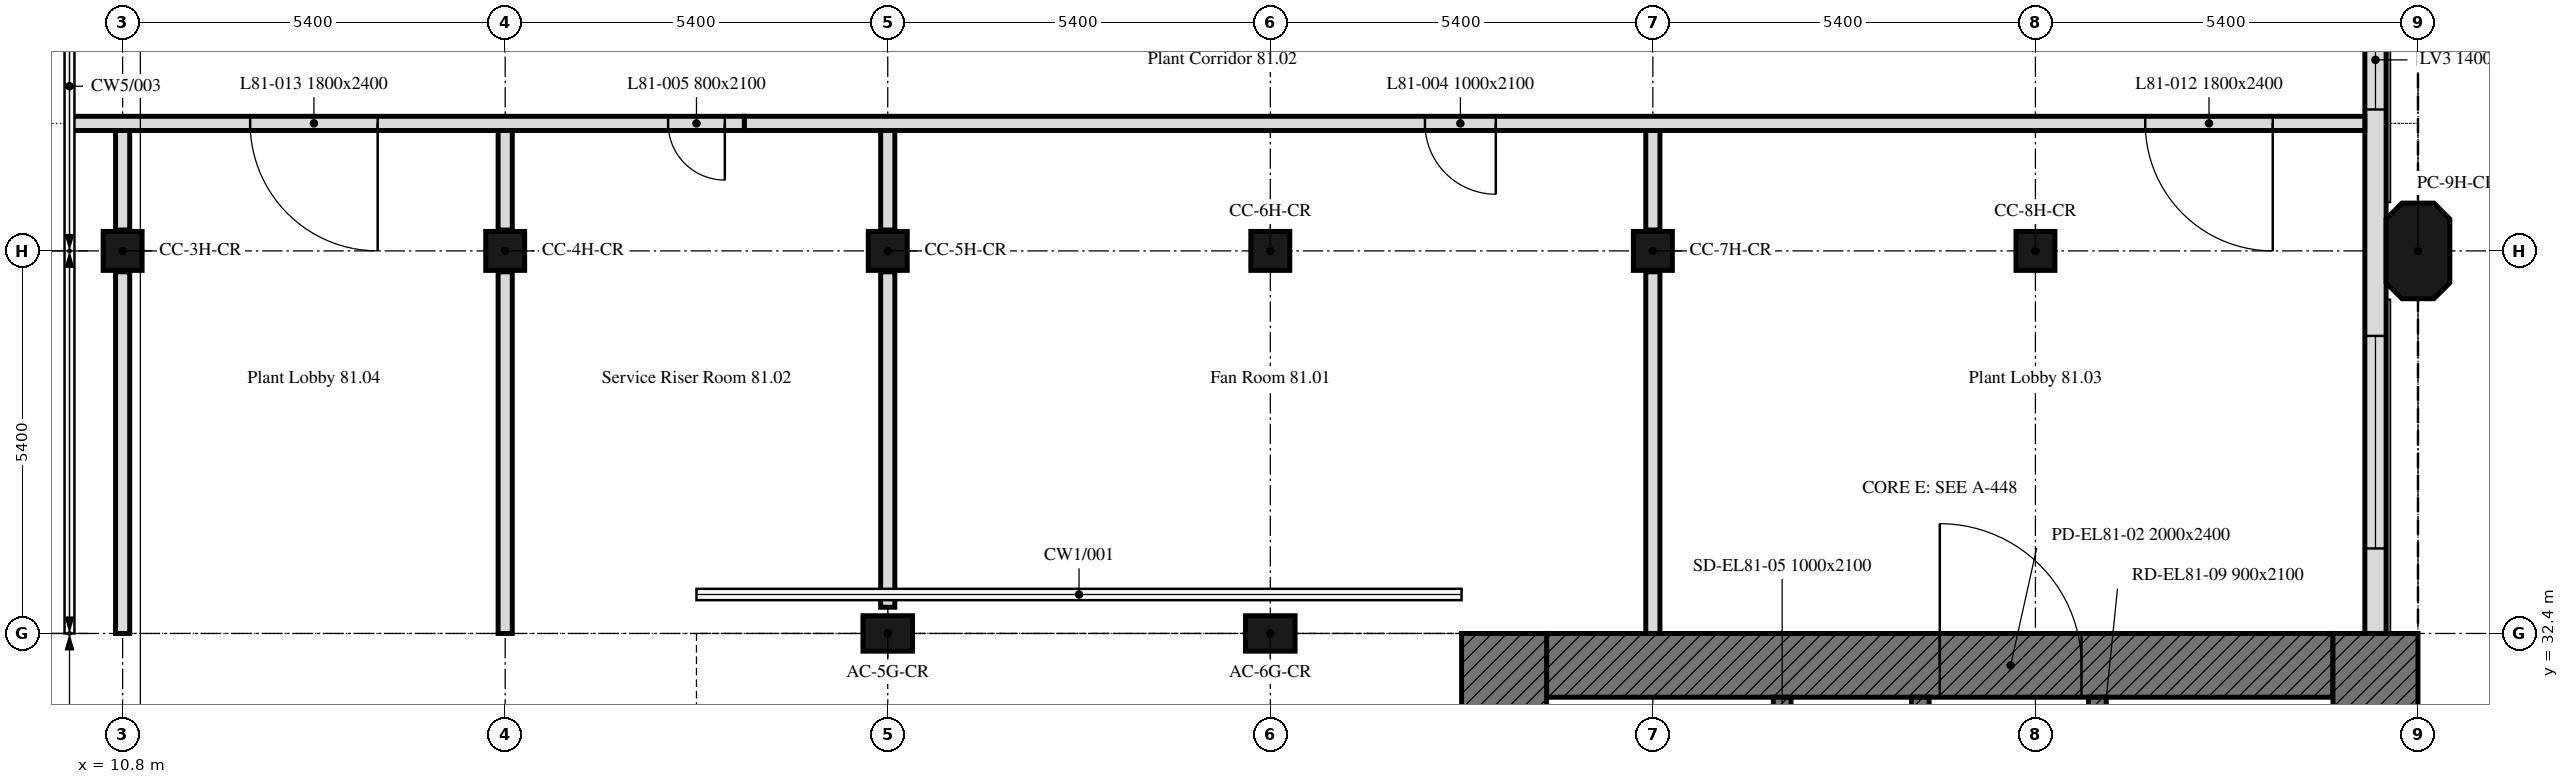
"""IFC4 building model, lengths in metres.
Left out: names, types, materials, properties, quantities, classifications, styles, units other than length and angle.
Written with IfcOpenShell. Run it as: python <this file> out.ifc"""

import sys

from ifc_helpers import new_model, si_unit, direction, frame, frame_2d, origin, origin_2d, place, context, subcontext, project, spatial, polyline, rectangle, outline, extrude, element, fill, save


model = new_model("IFC4")
c1 = context("Model", 3, precision=1e-05, world=origin(), true_north=direction((0.0, 1.0)))
c2 = subcontext(c1, "Body", "Model", "MODEL_VIEW")
j1 = project(units=[si_unit("LENGTHUNIT", "METRE"), si_unit("PLANEANGLEUNIT", "RADIAN")], contexts=[c1])
p1 = place(None, origin())
s1 = spatial("IfcSite", under=j1, at=p1, CompositionType="ELEMENT")
p2 = place(p1, origin())
s2 = spatial("IfcBuilding", under=s1, at=p2, CompositionType="ELEMENT")
p3 = place(p2, frame((0.0, 0.0, 326.2)))
s3 = spatial("IfcBuildingStorey", under=s2, at=p3, CompositionType="ELEMENT", Elevation=326.2)
for number, where, z_axis, x_axis in (
    (1, (21.6, 32.4, 0.0), (0.0, 0.0, 1.0), (1.0, 0.0, 0.0)),
    (2, (27.0, 32.4, 0.0), (0.0, 0.0, 1.0), (1.0, 0.0, 0.0)),
):
    element("IfcColumn", number, at=place(p3, frame(where, z_axis=z_axis, x_axis=x_axis)), inside=s3, PredefinedType="COLUMN", context=c2, shape_type="SweptSolid", body=[
        extrude(rectangle(XDim=0.7, YDim=0.5, at=origin_2d()), origin(), (0.0, 0.0, 1.0), 4.2),
    ])
p4 = place(p3, frame((10.8, 37.8, 0.0), z_axis=(0.0, 0.0, 1.0), x_axis=(1.0, 0.0, 0.0)))
e3 = element("IfcColumn", 3, at=p4, inside=s3, PredefinedType="COLUMN", context=c2, shape_type="SweptSolid", body=[
    extrude(rectangle(XDim=0.55, YDim=0.55, at=origin_2d()), origin(), (0.0, 0.0, 1.0), 3.3),
])
for number, where, z_axis, x_axis in (
    (4, (16.2, 37.8, 0.0), (0.0, 0.0, 1.0), (1.0, 0.0, 0.0)),
    (5, (21.6, 37.8, 0.0), (0.0, 0.0, 1.0), (1.0, 0.0, 0.0)),
    (6, (27.0, 37.8, 0.0), (0.0, 0.0, 1.0), (1.0, 0.0, 0.0)),
    (7, (32.4, 37.8, 0.0), (0.0, 0.0, 1.0), (1.0, 0.0, 0.0)),
    (8, (37.8, 37.8, 0.0), (0.0, 0.0, 1.0), (1.0, 0.0, 0.0)),
):
    element("IfcColumn", number, at=place(p3, frame(where, z_axis=z_axis, x_axis=x_axis)), inside=s3, PredefinedType="COLUMN", context=c2, shape_type="SweptSolid", body=[
        extrude(rectangle(XDim=0.55, YDim=0.55, at=origin_2d()), origin(), (0.0, 0.0, 1.0), 4.2),
    ])
p5 = place(p3, frame((43.2, 37.8, 0.0), z_axis=(0.0, 0.0, 1.0), x_axis=(0.0, 1.0, 0.0)))
e9 = element("IfcColumn", 9, at=p5, inside=s3, PredefinedType="COLUMN", context=c2, shape_type="SweptSolid", body=[
    extrude(outline(polyline([(-0.45, -0.45), (0.45, -0.45), (0.675, -0.225), (0.675, 0.225), (0.45, 0.45), (-0.45, 0.45), (-0.675, 0.225), (-0.675, -0.225), (-0.45, -0.45)])), origin(), (0.0, 0.0, 1.0), 4.2),
])
p6 = place(p3, frame((42.6, 32.4, 0.0), z_axis=(0.0, 0.0, 1.0), x_axis=(0.0, 1.0, 0.0)))
e10 = element("IfcWall", 10, at=p6, inside=s3, PredefinedType="SOLIDWALL", context=c2, shape_type="SweptSolid", body=[
    extrude(outline(polyline([(0.0, 0.0), (10.614, 0.0), (10.614, 4.2), (10.024, 4.2), (9.434, 4.2), (8.845, 4.2), (8.255, 4.2), (7.665, 4.2), (7.076, 4.2), (6.486, 4.2), (5.896, 4.2), (5.307, 4.2), (4.717, 4.2), (4.127, 4.2), (3.538, 4.2), (2.948, 4.2), (2.359, 4.2), (1.769, 4.2), (1.179, 4.2), (0.59, 4.2), (0.0, 4.2), (0.0, 0.0)])), frame((0.0, 0.15, 0.0), z_axis=(0.0, -1.0, 0.0), x_axis=(1.0, 0.0, 0.0)), (0.0, 0.0, 1.0), 0.3),
])
p7 = place(p6, frame((1.2, 0.0, 0.6)))
e11 = element("IfcOpeningElement", 11, at=p7, cuts=e10, PredefinedType="OPENING", context=c2, shape_type="SweptSolid", body=[
    extrude(rectangle(XDim=3.0, YDim=1.8, at=frame_2d((1.5, 0.9))), frame((0.0, 0.16, 0.0), z_axis=(0.0, -1.0, 0.0), x_axis=(1.0, 0.0, 0.0)), (0.0, 0.0, 1.0), 0.32),
])
p8 = place(p6, frame((7.396, 0.0, 0.6)))
e12 = element("IfcOpeningElement", 12, at=p8, cuts=e10, PredefinedType="OPENING", context=c2, shape_type="SweptSolid", body=[
    extrude(rectangle(XDim=1.4, YDim=1.8, at=frame_2d((0.7, 0.9))), frame((0.0, 0.16, 0.0), z_axis=(0.0, -1.0, 0.0), x_axis=(1.0, 0.0, 0.0)), (0.0, 0.0, 1.0), 0.32),
])
p9 = place(p3, frame((30.9, 31.95, 0.0), z_axis=(0.0, 0.0, 1.0), x_axis=(1.0, 0.0, 0.0)))
e13 = element("IfcWall", 13, at=p9, inside=s3, PredefinedType="SOLIDWALL", context=c2, shape_type="SweptSolid", body=[
    extrude(rectangle(XDim=11.1, YDim=0.9, at=frame_2d((5.55, 0.0))), origin(), (0.0, 0.0, 1.0), 4.2),
])
p10 = place(p9, frame((5.55, 0.0, 0.0)))
e14 = element("IfcOpeningElement", 14, at=p10, cuts=e13, PredefinedType="OPENING", context=c2, shape_type="SweptSolid", body=[
    extrude(rectangle(XDim=2.0, YDim=2.4, at=frame_2d((1.0, 1.2))), frame((0.0, 0.45, 0.0), z_axis=(0.0, -1.0, 0.0), x_axis=(1.0, 0.0, 0.0)), (0.0, 0.0, 1.0), 0.9),
])
for number, where, z_axis, x_axis in (
    (15, (42.6, 32.4, 0.0), (0.0, 0.0, 1.0), (0.0, -1.0, 0.0)),
    (16, (30.3, 16.2, 0.0), (0.0, 0.0, 1.0), (0.0, 1.0, 0.0)),
):
    element("IfcWall", number, at=place(p3, frame(where, z_axis=z_axis, x_axis=x_axis)), inside=s3, PredefinedType="SOLIDWALL", context=c2, shape_type="SweptSolid", body=[
        extrude(rectangle(XDim=16.2, YDim=1.2, at=frame_2d((8.1, 0.0))), origin(), (0.0, 0.0, 1.0), 4.2),
    ])
p11 = place(p3, frame((38.675, 17.1, 0.0), z_axis=(0.0, 0.0, 1.0), x_axis=(0.0, 1.0, 0.0)))
e17 = element("IfcWall", 17, at=p11, inside=s3, PredefinedType="SOLIDWALL", context=c2, shape_type="SweptSolid", body=[
    extrude(rectangle(XDim=14.4, YDim=0.25, at=frame_2d((7.2, 0.0))), origin(), (0.0, 0.0, 1.0), 4.2),
])
p12 = place(p11, frame((4.6, 0.0, 0.0)))
e18 = element("IfcOpeningElement", 18, at=p12, cuts=e17, PredefinedType="OPENING", context=c2, shape_type="SweptSolid", body=[
    extrude(rectangle(XDim=1.0, YDim=2.1, at=frame_2d((0.5, 1.05))), frame((0.0, 0.125, 0.0), z_axis=(0.0, -1.0, 0.0), x_axis=(1.0, 0.0, 0.0)), (0.0, 0.0, 1.0), 0.25),
])
p13 = place(p11, frame((7.062, 0.0, 0.0)))
e19 = element("IfcOpeningElement", 19, at=p13, cuts=e17, PredefinedType="OPENING", context=c2, shape_type="SweptSolid", body=[
    extrude(rectangle(XDim=1.2, YDim=2.1, at=frame_2d((0.6, 1.05))), frame((0.0, 0.125, 0.0), z_axis=(0.0, -1.0, 0.0), x_axis=(1.0, 0.0, 0.0)), (0.0, 0.0, 1.0), 0.25),
])
p14 = place(p11, frame((10.106, 0.0, 0.0)))
e20 = element("IfcOpeningElement", 20, at=p14, cuts=e17, PredefinedType="OPENING", context=c2, shape_type="SweptSolid", body=[
    extrude(rectangle(XDim=0.9, YDim=2.1, at=frame_2d((0.45, 1.05))), frame((0.0, 0.125, 0.0), z_axis=(0.0, -1.0, 0.0), x_axis=(1.0, 0.0, 0.0)), (0.0, 0.0, 1.0), 0.25),
])
p15 = place(p11, frame((12.719, 0.0, 0.0)))
e21 = element("IfcOpeningElement", 21, at=p15, cuts=e17, PredefinedType="OPENING", context=c2, shape_type="SweptSolid", body=[
    extrude(rectangle(XDim=0.9, YDim=2.1, at=frame_2d((0.45, 1.05))), frame((0.0, 0.125, 0.0), z_axis=(0.0, -1.0, 0.0), x_axis=(1.0, 0.0, 0.0)), (0.0, 0.0, 1.0), 0.25),
])
p16 = place(p3, frame((34.225, 17.1, 0.0), z_axis=(0.0, 0.0, 1.0), x_axis=(0.0, 1.0, 0.0)))
e22 = element("IfcWall", 22, at=p16, inside=s3, PredefinedType="SOLIDWALL", context=c2, shape_type="SweptSolid", body=[
    extrude(rectangle(XDim=14.4, YDim=0.25, at=frame_2d((7.2, 0.0))), origin(), (0.0, 0.0, 1.0), 4.2),
])
p17 = place(p16, frame((13.15, 0.0, 0.0)))
e23 = element("IfcOpeningElement", 23, at=p17, cuts=e22, PredefinedType="OPENING", context=c2, shape_type="SweptSolid", body=[
    extrude(rectangle(XDim=1.0, YDim=2.1, at=frame_2d((0.5, 1.05))), frame((0.0, 0.125, 0.0), z_axis=(0.0, -1.0, 0.0), x_axis=(1.0, 0.0, 0.0)), (0.0, 0.0, 1.0), 0.25),
])
p18 = place(p16, frame((0.968, 0.0, 0.0)))
e24 = element("IfcOpeningElement", 24, at=p18, cuts=e22, PredefinedType="OPENING", context=c2, shape_type="SweptSolid", body=[
    extrude(rectangle(XDim=0.9, YDim=2.1, at=frame_2d((0.45, 1.05))), frame((0.0, 0.125, 0.0), z_axis=(0.0, -1.0, 0.0), x_axis=(1.0, 0.0, 0.0)), (0.0, 0.0, 1.0), 0.25),
])
p19 = place(p16, frame((3.468, 0.0, 0.0)))
e25 = element("IfcOpeningElement", 25, at=p19, cuts=e22, PredefinedType="OPENING", context=c2, shape_type="SweptSolid", body=[
    extrude(rectangle(XDim=0.9, YDim=2.1, at=frame_2d((0.45, 1.05))), frame((0.0, 0.125, 0.0), z_axis=(0.0, -1.0, 0.0), x_axis=(1.0, 0.0, 0.0)), (0.0, 0.0, 1.0), 0.25),
])
p20 = place(p16, frame((6.175, 0.0, 0.0)))
e26 = element("IfcOpeningElement", 26, at=p20, cuts=e22, PredefinedType="OPENING", context=c2, shape_type="SweptSolid", body=[
    extrude(rectangle(XDim=0.9, YDim=2.1, at=frame_2d((0.45, 1.05))), frame((0.0, 0.125, 0.0), z_axis=(0.0, -1.0, 0.0), x_axis=(1.0, 0.0, 0.0)), (0.0, 0.0, 1.0), 0.25),
])
p21 = place(p3, frame((36.175, 29.4, 0.0), z_axis=(0.0, 0.0, 1.0), x_axis=(0.0, 1.0, 0.0)))
e27 = element("IfcWall", 27, at=p21, inside=s3, PredefinedType="SOLIDWALL", context=c2, shape_type="SweptSolid", body=[
    extrude(rectangle(XDim=2.1, YDim=0.25, at=frame_2d((1.05, 0.0))), origin(), (0.0, 0.0, 1.0), 4.2),
])
p22 = place(p21, frame((0.5, 0.0, 0.0)))
e28 = element("IfcOpeningElement", 28, at=p22, cuts=e27, PredefinedType="OPENING", context=c2, shape_type="SweptSolid", body=[
    extrude(rectangle(XDim=1.0, YDim=2.1, at=frame_2d((0.5, 1.05))), frame((0.0, 0.125, 0.0), z_axis=(0.0, -1.0, 0.0), x_axis=(1.0, 0.0, 0.0)), (0.0, 0.0, 1.0), 0.25),
])
p23 = place(p3, frame((32.4, 32.4, 0.0), z_axis=(0.0, 0.0, 1.0), x_axis=(0.0, 1.0, 0.0)))
e29 = element("IfcWall", 29, at=p23, inside=s3, PredefinedType="PARTITIONING", context=c2, shape_type="SweptSolid", body=[
    extrude(rectangle(XDim=5.105, YDim=0.2, at=frame_2d((2.552, 0.0))), origin(), (0.0, 0.0, 1.0), 3.45),
])
for number, where, z_axis, x_axis in (
    (30, (32.4, 38.095, 0.0), (0.0, 0.0, 1.0), (0.0, 1.0, 0.0)),
    (31, (21.6, 39.5, 0.0), (0.0, 0.0, 1.0), (0.0, -1.0, 0.0)),
):
    element("IfcWall", number, at=place(p3, frame(where, z_axis=z_axis, x_axis=x_axis)), inside=s3, PredefinedType="PARTITIONING", context=c2, shape_type="SweptSolid", body=[
        extrude(rectangle(XDim=1.405, YDim=0.2, at=frame_2d((0.703, 0.0))), origin(), (0.0, 0.0, 1.0), 3.45),
    ])
p24 = place(p3, frame((21.6, 37.505, 0.0), z_axis=(0.0, 0.0, 1.0), x_axis=(0.0, -1.0, 0.0)))
e32 = element("IfcWall", 32, at=p24, inside=s3, PredefinedType="PARTITIONING", context=c2, shape_type="SweptSolid", body=[
    extrude(rectangle(XDim=4.735, YDim=0.2, at=frame_2d((2.367, 0.0))), origin(), (0.0, 0.0, 1.0), 3.45),
])
p25 = place(p3, frame((16.2, 39.5, 0.0), z_axis=(0.0, 0.0, 1.0), x_axis=(0.0, -1.0, 0.0)))
e33 = element("IfcWall", 33, at=p25, inside=s3, PredefinedType="PARTITIONING", context=c2, shape_type="SweptSolid", body=[
    extrude(rectangle(XDim=1.405, YDim=0.2, at=frame_2d((0.703, 0.0))), origin(), (0.0, 0.0, 1.0), 5.7),
])
p26 = place(p3, frame((16.2, 37.505, 0.0), z_axis=(0.0, 0.0, 1.0), x_axis=(0.0, -1.0, 0.0)))
e34 = element("IfcWall", 34, at=p26, inside=s3, PredefinedType="PARTITIONING", context=c2, shape_type="SweptSolid", body=[
    extrude(rectangle(XDim=5.105, YDim=0.2, at=frame_2d((2.552, 0.0))), origin(), (0.0, 0.0, 1.0), 5.7),
])
p27 = place(p3, frame((10.8, 39.5, 0.0), z_axis=(0.0, 0.0, 1.0), x_axis=(0.0, -1.0, 0.0)))
e35 = element("IfcWall", 35, at=p27, inside=s3, PredefinedType="PARTITIONING", context=c2, shape_type="SweptSolid", body=[
    extrude(rectangle(XDim=1.405, YDim=0.2, at=frame_2d((0.703, 0.0))), origin(), (0.0, 0.0, 1.0), 3.3),
])
p28 = place(p3, frame((10.8, 37.505, 0.0), z_axis=(0.0, 0.0, 1.0), x_axis=(0.0, -1.0, 0.0)))
e36 = element("IfcWall", 36, at=p28, inside=s3, PredefinedType="PARTITIONING", context=c2, shape_type="SweptSolid", body=[
    extrude(rectangle(XDim=5.105, YDim=0.2, at=frame_2d((2.552, 0.0))), origin(), (0.0, 0.0, 1.0), 3.3),
])
p29 = place(p3, frame((42.449, 39.6, 0.0), z_axis=(0.0, 0.0, 1.0), x_axis=(-1.0, 0.0, 0.0)))
e37 = element("IfcWall", 37, at=p29, inside=s3, PredefinedType="PARTITIONING", context=c2, shape_type="SweptSolid", body=[
    extrude(rectangle(XDim=22.874, YDim=0.2, at=frame_2d((11.437, 0.0))), origin(), (0.0, 0.0, 1.0), 3.45),
])
p30 = place(p29, frame((12.266, 0.0, 0.0)))
e38 = element("IfcOpeningElement", 38, at=p30, cuts=e37, PredefinedType="OPENING", context=c2, shape_type="SweptSolid", body=[
    extrude(rectangle(XDim=1.0, YDim=2.1, at=frame_2d((0.5, 1.05))), frame((0.0, 0.1, 0.0), z_axis=(0.0, -1.0, 0.0), x_axis=(1.0, 0.0, 0.0)), (0.0, 0.0, 1.0), 0.2),
])
p31 = place(p29, frame((1.299, 0.0, 0.0)))
e39 = element("IfcOpeningElement", 39, at=p31, cuts=e37, PredefinedType="OPENING", context=c2, shape_type="SweptSolid", body=[
    extrude(rectangle(XDim=1.8, YDim=2.4, at=frame_2d((0.9, 1.2))), frame((0.0, 0.1, 0.0), z_axis=(0.0, -1.0, 0.0), x_axis=(1.0, 0.0, 0.0)), (0.0, 0.0, 1.0), 0.2),
])
p32 = place(p3, frame((19.575, 39.6, 0.0), z_axis=(0.0, 0.0, 1.0), x_axis=(-1.0, 0.0, 0.0)))
e40 = element("IfcWall", 40, at=p32, inside=s3, PredefinedType="PARTITIONING", context=c2, shape_type="SweptSolid", body=[
    extrude(outline(polyline([(0.0, 0.0), (9.525, 0.0), (9.525, 2.967), (0.0, 4.2), (0.0, 0.0)])), frame((0.0, 0.1, 0.0), z_axis=(0.0, -1.0, 0.0), x_axis=(1.0, 0.0, 0.0)), (0.0, 0.0, 1.0), 0.2),
])
p33 = place(p32, frame((0.275, 0.0, 0.0)))
e41 = element("IfcOpeningElement", 41, at=p33, cuts=e40, PredefinedType="OPENING", context=c2, shape_type="SweptSolid", body=[
    extrude(rectangle(XDim=0.8, YDim=2.1, at=frame_2d((0.4, 1.05))), frame((0.0, 0.1, 0.0), z_axis=(0.0, -1.0, 0.0), x_axis=(1.0, 0.0, 0.0)), (0.0, 0.0, 1.0), 0.2),
])
p34 = place(p32, frame((5.175, 0.0, 0.0)))
e42 = element("IfcOpeningElement", 42, at=p34, cuts=e40, PredefinedType="OPENING", context=c2, shape_type="SweptSolid", body=[
    extrude(rectangle(XDim=1.8, YDim=2.4, at=frame_2d((0.9, 1.2))), frame((0.0, 0.1, 0.0), z_axis=(0.0, -1.0, 0.0), x_axis=(1.0, 0.0, 0.0)), (0.0, 0.0, 1.0), 0.2),
])
p35 = place(p7, origin())
e43 = element("IfcWindow", 43, at=p35, inside=s3, PartitioningType="SINGLE_PANEL", PredefinedType="WINDOW", context=c2, shape_type="SweptSolid", body=[
    extrude(rectangle(XDim=3.0, YDim=1.8, at=frame_2d((1.5, 0.9))), frame((0.0, 0.03, 0.0), z_axis=(0.0, -1.0, 0.0), x_axis=(1.0, 0.0, 0.0)), (0.0, 0.0, 1.0), 0.06),
])
fill(e11, e43)
p36 = place(p8, origin())
e44 = element("IfcWindow", 44, at=p36, inside=s3, PartitioningType="SINGLE_PANEL", PredefinedType="WINDOW", context=c2, shape_type="SweptSolid", body=[
    extrude(rectangle(XDim=1.4, YDim=1.8, at=frame_2d((0.7, 0.9))), frame((0.0, 0.03, 0.0), z_axis=(0.0, -1.0, 0.0), x_axis=(1.0, 0.0, 0.0)), (0.0, 0.0, 1.0), 0.06),
])
fill(e12, e44)
p37 = place(p10, origin())
e45 = element("IfcDoor", 45, at=p37, inside=s3, OperationType="DOUBLE_DOOR_SINGLE_SWING", PredefinedType="DOOR", context=c2, shape_type="SweptSolid", body=[
    extrude(rectangle(XDim=2.0, YDim=2.4, at=frame_2d((1.0, 1.2))), frame((0.0, 0.025, 0.0), z_axis=(0.0, -1.0, 0.0), x_axis=(1.0, 0.0, 0.0)), (0.0, 0.0, 1.0), 0.05),
])
fill(e14, e45)
p38 = place(p30, origin())
e46 = element("IfcDoor", 46, at=p38, inside=s3, OperationType="SINGLE_SWING_LEFT", PredefinedType="DOOR", context=c2, shape_type="SweptSolid", body=[
    extrude(rectangle(XDim=1.0, YDim=2.1, at=frame_2d((0.5, 1.05))), frame((0.0, 0.025, 0.0), z_axis=(0.0, -1.0, 0.0), x_axis=(1.0, 0.0, 0.0)), (0.0, 0.0, 1.0), 0.05),
])
fill(e38, e46)
p39 = place(p33, origin())
e47 = element("IfcDoor", 47, at=p39, inside=s3, OperationType="SINGLE_SWING_RIGHT", PredefinedType="DOOR", context=c2, shape_type="SweptSolid", body=[
    extrude(rectangle(XDim=0.8, YDim=2.1, at=frame_2d((0.4, 1.05))), frame((0.0, 0.025, 0.0), z_axis=(0.0, -1.0, 0.0), x_axis=(1.0, 0.0, 0.0)), (0.0, 0.0, 1.0), 0.05),
])
fill(e41, e47)
p40 = place(p31, origin())
e48 = element("IfcDoor", 48, at=p40, inside=s3, OperationType="DOUBLE_DOOR_SINGLE_SWING", PredefinedType="DOOR", context=c2, shape_type="SweptSolid", body=[
    extrude(rectangle(XDim=1.8, YDim=2.4, at=frame_2d((0.9, 1.2))), frame((0.0, 0.025, 0.0), z_axis=(0.0, -1.0, 0.0), x_axis=(1.0, 0.0, 0.0)), (0.0, 0.0, 1.0), 0.05),
])
fill(e39, e48)
p41 = place(p34, origin())
e49 = element("IfcDoor", 49, at=p41, inside=s3, OperationType="DOUBLE_DOOR_SINGLE_SWING", PredefinedType="DOOR", context=c2, shape_type="SweptSolid", body=[
    extrude(rectangle(XDim=1.8, YDim=2.4, at=frame_2d((0.9, 1.2))), frame((0.0, 0.025, 0.0), z_axis=(0.0, -1.0, 0.0), x_axis=(1.0, 0.0, 0.0)), (0.0, 0.0, 1.0), 0.05),
])
fill(e42, e49)
save(model, sys.argv[1])
